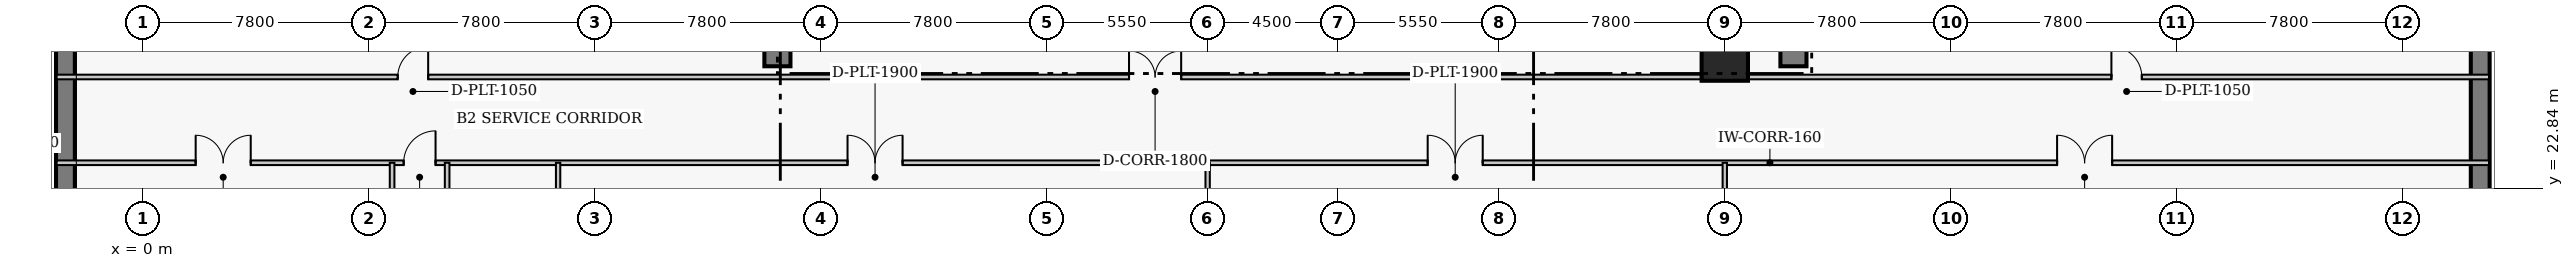
"""IFC4 building model, lengths in metres.
Left out: names, types, materials, properties, quantities, classifications, styles, units other than length and angle.
Written with IfcOpenShell. Run it as: python <this file> out.ifc"""

import sys

from ifc_helpers import new_model, si_unit, direction, frame, frame_2d, origin, origin_2d, place, context, subcontext, project, spatial, rectangle, extrude, element, fill, save


model = new_model("IFC4")
c1 = context("Model", 3, precision=1e-05, world=origin(), true_north=direction((0.0, 1.0)))
c2 = subcontext(c1, "Body", "Model", "MODEL_VIEW")
j1 = project(units=[si_unit("LENGTHUNIT", "METRE"), si_unit("PLANEANGLEUNIT", "RADIAN")], contexts=[c1])
p1 = place(None, origin())
s1 = spatial("IfcSite", under=j1, at=p1, CompositionType="ELEMENT")
p2 = place(p1, origin())
s2 = spatial("IfcBuilding", under=s1, at=p2, CompositionType="ELEMENT")
p3 = place(p2, frame((0.0, 0.0, -9.0)))
s3 = spatial("IfcBuildingStorey", under=s2, at=p3, CompositionType="ELEMENT", Elevation=-9.0)
for number, where, z_axis, x_axis in (
    (1, (80.675, 2.58, 0.0), (0.0, 0.0, 1.0), (0.0, 1.0, 0.0)),
    (2, (-2.675, 49.42, 0.0), (0.0, 0.0, 1.0), (0.0, -1.0, 0.0)),
):
    element("IfcWall", number, at=place(p3, frame(where, z_axis=z_axis, x_axis=x_axis)), inside=s3, PredefinedType="USERDEFINED", context=c2, shape_type="SweptSolid", body=[
        extrude(rectangle(XDim=46.84, YDim=0.65, at=frame_2d((23.42, 0.0))), origin(), (0.0, 0.0, 1.0), 4.18),
    ])
for number, where, z_axis, x_axis in (
    (3, (21.9, 27.05, 0.0), (0.0, 0.0, 1.0), (0.0, 1.0, 0.0)),
    (4, (56.97, 27.05, 0.0), (0.0, 0.0, 1.0), (0.0, 1.0, 0.0)),
):
    element("IfcWall", number, at=place(p3, frame(where, z_axis=z_axis, x_axis=x_axis)), inside=s3, PredefinedType="SHEAR", context=c2, shape_type="SweptSolid", body=[
        extrude(rectangle(XDim=13.72, YDim=0.9, at=frame_2d((6.86, 0.0))), origin(), (0.0, 0.0, 1.0), 4.5),
    ])
p4 = place(p3, frame((54.6, 27.35, 0.0), z_axis=(0.0, 0.0, 1.0), x_axis=(1.0, 0.0, 0.0)))
e5 = element("IfcColumn", 5, at=p4, inside=s3, PredefinedType="COLUMN", context=c2, shape_type="SweptSolid", body=[
    extrude(rectangle(XDim=1.6, YDim=1.6, at=origin_2d()), origin(), (0.0, 0.0, 1.0), 4.5),
])
p5 = place(p3, frame((-2.98, 23.72, 0.0), z_axis=(0.0, 0.0, 1.0), x_axis=(1.0, 0.0, 0.0)))
e6 = element("IfcWall", 6, at=p5, inside=s3, PredefinedType="PARTITIONING", context=c2, shape_type="SweptSolid", body=[
    extrude(rectangle(XDim=83.96, YDim=0.16, at=frame_2d((41.98, 0.0))), origin(), (0.0, 0.0, 1.0), 4.18),
])
p6 = place(p5, frame((11.98, 0.0, 0.0)))
e7 = element("IfcOpeningElement", 7, at=p6, cuts=e6, PredefinedType="OPENING", context=c2, shape_type="SweptSolid", body=[
    extrude(rectangle(XDim=1.1, YDim=2.15, at=frame_2d((0.55, 1.075))), frame((0.0, 0.09, 0.0), z_axis=(0.0, -1.0, 0.0), x_axis=(1.0, 0.0, 0.0)), (0.0, 0.0, 1.0), 0.18),
])
p7 = place(p5, frame((4.8, 0.0, 0.0)))
e8 = element("IfcOpeningElement", 8, at=p7, cuts=e6, PredefinedType="OPENING", context=c2, shape_type="SweptSolid", body=[
    extrude(rectangle(XDim=1.9, YDim=2.25, at=frame_2d((0.95, 1.125))), frame((0.0, 0.09, 0.0), z_axis=(0.0, -1.0, 0.0), x_axis=(1.0, 0.0, 0.0)), (0.0, 0.0, 1.0), 0.18),
])
p8 = place(p5, frame((27.3, 0.0, 0.0)))
e9 = element("IfcOpeningElement", 9, at=p8, cuts=e6, PredefinedType="OPENING", context=c2, shape_type="SweptSolid", body=[
    extrude(rectangle(XDim=1.9, YDim=2.25, at=frame_2d((0.95, 1.125))), frame((0.0, 0.09, 0.0), z_axis=(0.0, -1.0, 0.0), x_axis=(1.0, 0.0, 0.0)), (0.0, 0.0, 1.0), 0.18),
])
p9 = place(p5, frame((47.325, 0.0, 0.0)))
e10 = element("IfcOpeningElement", 10, at=p9, cuts=e6, PredefinedType="OPENING", context=c2, shape_type="SweptSolid", body=[
    extrude(rectangle(XDim=1.9, YDim=2.25, at=frame_2d((0.95, 1.125))), frame((0.0, 0.09, 0.0), z_axis=(0.0, -1.0, 0.0), x_axis=(1.0, 0.0, 0.0)), (0.0, 0.0, 1.0), 0.18),
])
p10 = place(p5, frame((69.05, 0.0, 0.0)))
e11 = element("IfcOpeningElement", 11, at=p10, cuts=e6, PredefinedType="OPENING", context=c2, shape_type="SweptSolid", body=[
    extrude(rectangle(XDim=1.9, YDim=2.25, at=frame_2d((0.95, 1.125))), frame((0.0, 0.09, 0.0), z_axis=(0.0, -1.0, 0.0), x_axis=(1.0, 0.0, 0.0)), (0.0, 0.0, 1.0), 0.18),
])
p11 = place(p3, frame((-2.98, 26.68, 0.0), z_axis=(0.0, 0.0, 1.0), x_axis=(1.0, 0.0, 0.0)))
e12 = element("IfcWall", 12, at=p11, inside=s3, PredefinedType="PARTITIONING", context=c2, shape_type="SweptSolid", body=[
    extrude(rectangle(XDim=83.96, YDim=0.16, at=frame_2d((41.98, 0.0))), origin(), (0.0, 0.0, 1.0), 4.18),
])
p12 = place(p11, frame((37.016, 0.0, 0.0)))
e13 = element("IfcOpeningElement", 13, at=p12, cuts=e12, PredefinedType="OPENING", context=c2, shape_type="SweptSolid", body=[
    extrude(rectangle(XDim=1.8, YDim=2.2, at=frame_2d((0.9, 1.1))), frame((0.0, 0.09, 0.0), z_axis=(0.0, -1.0, 0.0), x_axis=(1.0, 0.0, 0.0)), (0.0, 0.0, 1.0), 0.18),
])
p13 = place(p11, frame((11.775, 0.0, 0.0)))
e14 = element("IfcOpeningElement", 14, at=p13, cuts=e12, PredefinedType="OPENING", context=c2, shape_type="SweptSolid", body=[
    extrude(rectangle(XDim=1.05, YDim=2.15, at=frame_2d((0.525, 1.075))), frame((0.0, 0.09, 0.0), z_axis=(0.0, -1.0, 0.0), x_axis=(1.0, 0.0, 0.0)), (0.0, 0.0, 1.0), 0.18),
])
p14 = place(p11, frame((70.925, 0.0, 0.0)))
e15 = element("IfcOpeningElement", 15, at=p14, cuts=e12, PredefinedType="OPENING", context=c2, shape_type="SweptSolid", body=[
    extrude(rectangle(XDim=1.05, YDim=2.15, at=frame_2d((0.525, 1.075))), frame((0.0, 0.09, 0.0), z_axis=(0.0, -1.0, 0.0), x_axis=(1.0, 0.0, 0.0)), (0.0, 0.0, 1.0), 0.18),
])
p15 = place(p3, frame((8.6, 3.0, 0.0), z_axis=(0.0, 0.0, 1.0), x_axis=(0.0, 1.0, 0.0)))
e16 = element("IfcWall", 16, at=p15, inside=s3, PredefinedType="PARTITIONING", context=c2, shape_type="SweptSolid", body=[
    extrude(rectangle(XDim=20.72, YDim=0.16, at=frame_2d((10.36, 0.0))), origin(), (0.0, 0.0, 1.0), 4.18),
])
p16 = place(p3, frame((10.5, 10.95, 0.0), z_axis=(0.0, 0.0, 1.0), x_axis=(0.0, 1.0, 0.0)))
e17 = element("IfcWall", 17, at=p16, inside=s3, PredefinedType="PARTITIONING", context=c2, shape_type="SweptSolid", body=[
    extrude(rectangle(XDim=12.77, YDim=0.16, at=frame_2d((6.385, 0.0))), origin(), (0.0, 0.0, 1.0), 4.18),
])
p17 = place(p3, frame((14.33, 10.95, 0.0), z_axis=(0.0, 0.0, 1.0), x_axis=(0.0, 1.0, 0.0)))
e18 = element("IfcWall", 18, at=p17, inside=s3, PredefinedType="PARTITIONING", context=c2, shape_type="SweptSolid", body=[
    extrude(rectangle(XDim=12.77, YDim=0.15, at=frame_2d((6.385, 0.0))), origin(), (0.0, 0.0, 1.0), 4.18),
])
for number, where, z_axis, x_axis in (
    (19, (36.75, 0.42, 0.0), (0.0, 0.0, 1.0), (0.0, 1.0, 0.0)),
    (20, (54.6, 0.42, 0.0), (0.0, 0.0, 1.0), (0.0, 1.0, 0.0)),
):
    element("IfcWall", number, at=place(p3, frame(where, z_axis=z_axis, x_axis=x_axis)), inside=s3, PredefinedType="PARTITIONING", context=c2, shape_type="SweptSolid", body=[
        extrude(rectangle(XDim=23.3, YDim=0.15, at=frame_2d((11.65, 0.0))), origin(), (0.0, 0.0, 1.0), 3.14),
    ])
p18 = place(p12, origin())
e21 = element("IfcDoor", 21, at=p18, inside=s3, OperationType="DOUBLE_DOOR_SINGLE_SWING", PredefinedType="DOOR", context=c2, shape_type="SweptSolid", body=[
    extrude(rectangle(XDim=1.8, YDim=2.2, at=frame_2d((0.9, 1.1))), frame((0.0, 0.025, 0.0), z_axis=(0.0, -1.0, 0.0), x_axis=(1.0, 0.0, 0.0)), (0.0, 0.0, 1.0), 0.05),
])
fill(e13, e21)
p19 = place(p6, origin())
e22 = element("IfcDoor", 22, at=p19, inside=s3, OperationType="SINGLE_SWING_RIGHT", PredefinedType="DOOR", context=c2, shape_type="SweptSolid", body=[
    extrude(rectangle(XDim=1.1, YDim=2.15, at=frame_2d((0.55, 1.075))), frame((0.0, 0.025, 0.0), z_axis=(0.0, -1.0, 0.0), x_axis=(1.0, 0.0, 0.0)), (0.0, 0.0, 1.0), 0.05),
])
fill(e7, e22)
p20 = place(p7, origin())
e23 = element("IfcDoor", 23, at=p20, inside=s3, OperationType="DOUBLE_DOOR_SINGLE_SWING", PredefinedType="DOOR", context=c2, shape_type="SweptSolid", body=[
    extrude(rectangle(XDim=1.9, YDim=2.25, at=frame_2d((0.95, 1.125))), frame((0.0, 0.025, 0.0), z_axis=(0.0, -1.0, 0.0), x_axis=(1.0, 0.0, 0.0)), (0.0, 0.0, 1.0), 0.05),
])
fill(e8, e23)
p21 = place(p8, origin())
e24 = element("IfcDoor", 24, at=p21, inside=s3, OperationType="DOUBLE_DOOR_SINGLE_SWING", PredefinedType="DOOR", context=c2, shape_type="SweptSolid", body=[
    extrude(rectangle(XDim=1.9, YDim=2.25, at=frame_2d((0.95, 1.125))), frame((0.0, 0.025, 0.0), z_axis=(0.0, -1.0, 0.0), x_axis=(1.0, 0.0, 0.0)), (0.0, 0.0, 1.0), 0.05),
])
fill(e9, e24)
p22 = place(p9, origin())
e25 = element("IfcDoor", 25, at=p22, inside=s3, OperationType="DOUBLE_DOOR_SINGLE_SWING", PredefinedType="DOOR", context=c2, shape_type="SweptSolid", body=[
    extrude(rectangle(XDim=1.9, YDim=2.25, at=frame_2d((0.95, 1.125))), frame((0.0, 0.025, 0.0), z_axis=(0.0, -1.0, 0.0), x_axis=(1.0, 0.0, 0.0)), (0.0, 0.0, 1.0), 0.05),
])
fill(e10, e25)
p23 = place(p10, origin())
e26 = element("IfcDoor", 26, at=p23, inside=s3, OperationType="DOUBLE_DOOR_SINGLE_SWING", PredefinedType="DOOR", context=c2, shape_type="SweptSolid", body=[
    extrude(rectangle(XDim=1.9, YDim=2.25, at=frame_2d((0.95, 1.125))), frame((0.0, 0.025, 0.0), z_axis=(0.0, -1.0, 0.0), x_axis=(1.0, 0.0, 0.0)), (0.0, 0.0, 1.0), 0.05),
])
fill(e11, e26)
p24 = place(p13, origin())
e27 = element("IfcDoor", 27, at=p24, inside=s3, OperationType="SINGLE_SWING_RIGHT", PredefinedType="DOOR", context=c2, shape_type="SweptSolid", body=[
    extrude(rectangle(XDim=1.05, YDim=2.15, at=frame_2d((0.525, 1.075))), frame((0.0, 0.025, 0.0), z_axis=(0.0, -1.0, 0.0), x_axis=(1.0, 0.0, 0.0)), (0.0, 0.0, 1.0), 0.05),
])
fill(e14, e27)
p25 = place(p14, origin())
e28 = element("IfcDoor", 28, at=p25, inside=s3, OperationType="SINGLE_SWING_LEFT", PredefinedType="DOOR", context=c2, shape_type="SweptSolid", body=[
    extrude(rectangle(XDim=1.05, YDim=2.15, at=frame_2d((0.525, 1.075))), frame((0.0, 0.025, 0.0), z_axis=(0.0, -1.0, 0.0), x_axis=(1.0, 0.0, 0.0)), (0.0, 0.0, 1.0), 0.05),
])
fill(e15, e28)
save(model, sys.argv[1])
